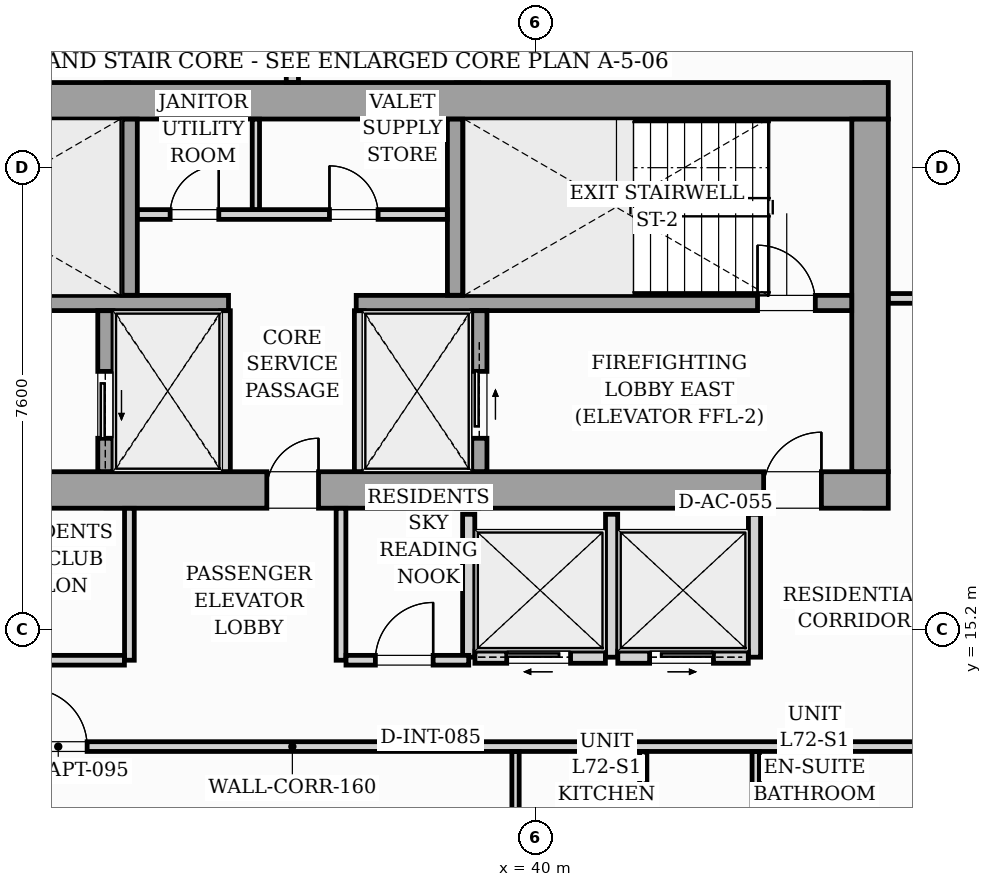
"""IFC4 building model, lengths in metres.
Left out: names, types, materials, properties, quantities, classifications, styles, units other than length and angle.
Written with IfcOpenShell. Run it as: python <this file> out.ifc"""

import sys

from ifc_helpers import new_model, si_unit, direction, frame, frame_2d, origin, origin_2d, place, context, subcontext, project, spatial, rectangle, i_section, extrude, source, transform, mapped, element, fill, save


model = new_model("IFC4")
c1 = context("Model", 3, precision=1e-05, world=origin(), true_north=direction((0.0, 1.0)))
c2 = subcontext(c1, "Body", "Model", "MODEL_VIEW")
j1 = project(units=[si_unit("LENGTHUNIT", "METRE"), si_unit("PLANEANGLEUNIT", "RADIAN")], contexts=[c1])
p1 = place(None, origin())
s1 = spatial("IfcSite", under=j1, at=p1, CompositionType="ELEMENT")
p2 = place(p1, origin())
s2 = spatial("IfcBuilding", under=s1, at=p2, CompositionType="ELEMENT")
p3 = place(p2, frame((0.0, 0.0, 249.6)))
s3 = spatial("IfcBuildingStorey", under=s2, at=p3, CompositionType="ELEMENT", Elevation=249.6)
m1 = source(origin(), c2, "Body", "SweptSolid", [
    extrude(i_section(OverallWidth=0.409, OverallDepth=0.425, WebThickness=0.033, FlangeThickness=0.052, FilletRadius=0.018, at=origin_2d()), origin(), (0.0, 0.0, 1.0), 3.296),
])
for number, where, z_axis, x_axis in (
    (1, (33.12, 17.4, 0.002), (0.0, 0.0, 1.0), (1.0, 0.0, 0.0)),
    (2, (38.88, 17.4, 0.002), (0.0, 0.0, 1.0), (1.0, 0.0, 0.0)),
    (3, (45.6, 17.4, 0.002), (0.0, 0.0, 1.0), (1.0, 0.0, 0.0)),
    (4, (33.12, 24.0, 0.002), (0.0, 0.0, 1.0), (1.0, 0.0, 0.0)),
    (5, (38.88, 24.0, 0.002), (0.0, 0.0, 1.0), (1.0, 0.0, 0.0)),
    (6, (45.6, 24.0, 0.002), (0.0, 0.0, 1.0), (1.0, 0.0, 0.0)),
):
    element("IfcColumn", number, at=place(p3, frame(where, z_axis=z_axis, x_axis=x_axis)), inside=s3, PredefinedType="PILASTER", context=c2, shape_type="MappedRepresentation", body=[
        mapped(m1, transform((0.0, 0.0, 0.0), scale=1.0)),
    ])
p4 = place(p3, frame((26.2, 17.5, 0.0), z_axis=(0.0, 0.0, 1.0), x_axis=(1.0, 0.0, 0.0)))
e7 = element("IfcWall", 7, at=p4, inside=s3, PredefinedType="SHEAR", context=c2, shape_type="SweptSolid", body=[
    extrude(rectangle(XDim=19.6, YDim=0.6, at=frame_2d((9.8, 0.0))), origin(), (0.0, 0.0, 1.0), 3.3),
])
p5 = place(p4, frame((0.95, 0.0, 0.0)))
e8 = element("IfcOpeningElement", 8, at=p5, cuts=e7, PredefinedType="OPENING", context=c2, shape_type="SweptSolid", body=[
    extrude(rectangle(XDim=0.95, YDim=2.06, at=frame_2d((0.475, 1.03))), frame((0.0, 0.31, 0.0), z_axis=(0.0, -1.0, 0.0), x_axis=(1.0, 0.0, 0.0)), (0.0, 0.0, 1.0), 0.62),
])
p6 = place(p4, frame((9.38, 0.0, 0.0)))
e9 = element("IfcOpeningElement", 9, at=p6, cuts=e7, PredefinedType="OPENING", context=c2, shape_type="SweptSolid", body=[
    extrude(rectangle(XDim=0.85, YDim=2.0, at=frame_2d((0.425, 1.0))), frame((0.0, 0.31, 0.0), z_axis=(0.0, -1.0, 0.0), x_axis=(1.0, 0.0, 0.0)), (0.0, 0.0, 1.0), 0.62),
])
p7 = place(p4, frame((17.55, 0.0, 0.0)))
e10 = element("IfcOpeningElement", 10, at=p7, cuts=e7, PredefinedType="OPENING", context=c2, shape_type="SweptSolid", body=[
    extrude(rectangle(XDim=0.95, YDim=2.06, at=frame_2d((0.475, 1.03))), frame((0.0, 0.31, 0.0), z_axis=(0.0, -1.0, 0.0), x_axis=(1.0, 0.0, 0.0)), (0.0, 0.0, 1.0), 0.62),
])
p8 = place(p3, frame((26.2, 23.9, 0.0), z_axis=(0.0, 0.0, 1.0), x_axis=(1.0, 0.0, 0.0)))
e11 = element("IfcWall", 11, at=p8, inside=s3, PredefinedType="SHEAR", context=c2, shape_type="SweptSolid", body=[
    extrude(rectangle(XDim=19.6, YDim=0.6, at=frame_2d((9.8, 0.0))), origin(), (0.0, 0.0, 1.0), 3.3),
])
p9 = place(p3, frame((45.5, 17.802, 0.0), z_axis=(0.0, 0.0, 1.0), x_axis=(0.0, 1.0, 0.0)))
e12 = element("IfcWall", 12, at=p9, inside=s3, PredefinedType="SHEAR", context=c2, shape_type="SweptSolid", body=[
    extrude(rectangle(XDim=5.796, YDim=0.6, at=frame_2d((2.898, 0.0))), origin(), (0.0, 0.0, 1.0), 3.3),
])
p10 = place(p3, frame((26.802, 20.575, 0.0), z_axis=(0.0, 0.0, 1.0), x_axis=(1.0, 0.0, 0.0)))
e13 = element("IfcWall", 13, at=p10, inside=s3, PredefinedType="SOLIDWALL", context=c2, shape_type="SweptSolid", body=[
    extrude(rectangle(XDim=8.148, YDim=0.25, at=frame_2d((4.074, 0.0))), origin(), (0.0, 0.0, 1.0), 3.3),
])
p11 = place(p10, frame((0.298, 0.0, 0.0)))
e14 = element("IfcOpeningElement", 14, at=p11, cuts=e13, PredefinedType="OPENING", context=c2, shape_type="SweptSolid", body=[
    extrude(rectangle(XDim=0.95, YDim=2.06, at=frame_2d((0.475, 1.03))), frame((0.0, 0.135, 0.0), z_axis=(0.0, -1.0, 0.0), x_axis=(1.0, 0.0, 0.0)), (0.0, 0.0, 1.0), 0.27),
])
p12 = place(p3, frame((37.05, 20.575, 0.0), z_axis=(0.0, 0.0, 1.0), x_axis=(1.0, 0.0, 0.0)))
e15 = element("IfcWall", 15, at=p12, inside=s3, PredefinedType="SOLIDWALL", context=c2, shape_type="SweptSolid", body=[
    extrude(rectangle(XDim=8.148, YDim=0.25, at=frame_2d((4.074, 0.0))), origin(), (0.0, 0.0, 1.0), 3.3),
])
p13 = place(p12, frame((6.6, 0.0, 0.0)))
e16 = element("IfcOpeningElement", 16, at=p13, cuts=e15, PredefinedType="OPENING", context=c2, shape_type="SweptSolid", body=[
    extrude(rectangle(XDim=0.95, YDim=2.06, at=frame_2d((0.475, 1.03))), frame((0.0, 0.135, 0.0), z_axis=(0.0, -1.0, 0.0), x_axis=(1.0, 0.0, 0.0)), (0.0, 0.0, 1.0), 0.27),
])
for number, where, z_axis, x_axis in (
    (17, (33.325, 20.702, 0.0), (0.0, 0.0, 1.0), (0.0, 1.0, 0.0)),
    (18, (38.675, 20.702, 0.0), (0.0, 0.0, 1.0), (0.0, 1.0, 0.0)),
):
    element("IfcWall", number, at=place(p3, frame(where, z_axis=z_axis, x_axis=x_axis)), inside=s3, PredefinedType="SOLIDWALL", context=c2, shape_type="SweptSolid", body=[
        extrude(rectangle(XDim=2.896, YDim=0.25, at=frame_2d((1.448, 0.0))), origin(), (0.0, 0.0, 1.0), 3.3),
    ])
p14 = place(p3, frame((32.925, 17.802, 0.0), z_axis=(0.0, 0.0, 1.0), x_axis=(0.0, 1.0, 0.0)))
e19 = element("IfcWall", 19, at=p14, inside=s3, PredefinedType="SOLIDWALL", context=c2, shape_type="SweptSolid", body=[
    extrude(rectangle(XDim=2.646, YDim=0.25, at=frame_2d((1.323, 0.0))), origin(), (0.0, 0.0, 1.0), 3.3),
])
p15 = place(p14, frame((0.548, 0.0, 0.0)))
e20 = element("IfcOpeningElement", 20, at=p15, cuts=e19, PredefinedType="OPENING", context=c2, shape_type="SweptSolid", body=[
    extrude(rectangle(XDim=1.1, YDim=2.08, at=frame_2d((0.55, 1.04))), frame((0.0, 0.135, 0.0), z_axis=(0.0, -1.0, 0.0), x_axis=(1.0, 0.0, 0.0)), (0.0, 0.0, 1.0), 0.27),
])
for number, where, z_axis, x_axis in (
    (21, (34.9, 17.802, 0.0), (0.0, 0.0, 1.0), (0.0, 1.0, 0.0)),
    (22, (37.1, 17.802, 0.0), (0.0, 0.0, 1.0), (0.0, 1.0, 0.0)),
):
    element("IfcWall", number, at=place(p3, frame(where, z_axis=z_axis, x_axis=x_axis)), inside=s3, PredefinedType="PARTITIONING", context=c2, shape_type="SweptSolid", body=[
        extrude(rectangle(XDim=2.646, YDim=0.16, at=frame_2d((1.323, 0.0))), origin(), (0.0, 0.0, 1.0), 3.04),
    ])
p16 = place(p3, frame((39.075, 17.802, 0.0), z_axis=(0.0, 0.0, 1.0), x_axis=(0.0, 1.0, 0.0)))
e23 = element("IfcWall", 23, at=p16, inside=s3, PredefinedType="SOLIDWALL", context=c2, shape_type="SweptSolid", body=[
    extrude(rectangle(XDim=2.646, YDim=0.25, at=frame_2d((1.323, 0.0))), origin(), (0.0, 0.0, 1.0), 3.3),
])
p17 = place(p16, frame((0.548, 0.0, 0.0)))
e24 = element("IfcOpeningElement", 24, at=p17, cuts=e23, PredefinedType="OPENING", context=c2, shape_type="SweptSolid", body=[
    extrude(rectangle(XDim=1.1, YDim=2.08, at=frame_2d((0.55, 1.04))), frame((0.0, 0.135, 0.0), z_axis=(0.0, -1.0, 0.0), x_axis=(1.0, 0.0, 0.0)), (0.0, 0.0, 1.0), 0.27),
])
p18 = place(p3, frame((33.452, 22.03, 0.0), z_axis=(0.0, 0.0, 1.0), x_axis=(1.0, 0.0, 0.0)))
e25 = element("IfcWall", 25, at=p18, inside=s3, PredefinedType="PARTITIONING", context=c2, shape_type="SweptSolid", body=[
    extrude(rectangle(XDim=5.096, YDim=0.16, at=frame_2d((2.548, 0.0))), origin(), (0.0, 0.0, 1.0), 3.04),
])
p19 = place(p18, frame((0.538, 0.0, 0.0)))
e26 = element("IfcOpeningElement", 26, at=p19, cuts=e25, PredefinedType="OPENING", context=c2, shape_type="SweptSolid", body=[
    extrude(rectangle(XDim=0.8, YDim=2.05, at=frame_2d((0.4, 1.025))), frame((0.0, 0.09, 0.0), z_axis=(0.0, -1.0, 0.0), x_axis=(1.0, 0.0, 0.0)), (0.0, 0.0, 1.0), 0.18),
])
p20 = place(p18, frame((3.158, 0.0, 0.0)))
e27 = element("IfcOpeningElement", 27, at=p20, cuts=e25, PredefinedType="OPENING", context=c2, shape_type="SweptSolid", body=[
    extrude(rectangle(XDim=0.8, YDim=2.05, at=frame_2d((0.4, 1.025))), frame((0.0, 0.09, 0.0), z_axis=(0.0, -1.0, 0.0), x_axis=(1.0, 0.0, 0.0)), (0.0, 0.0, 1.0), 0.18),
])
p21 = place(p3, frame((35.4, 22.112, 0.0), z_axis=(0.0, 0.0, 1.0), x_axis=(0.0, 1.0, 0.0)))
e28 = element("IfcWall", 28, at=p21, inside=s3, PredefinedType="PARTITIONING", context=c2, shape_type="SweptSolid", body=[
    extrude(rectangle(XDim=1.486, YDim=0.12, at=frame_2d((0.743, 0.0))), origin(), (0.0, 0.0, 1.0), 3.04),
])
for number, where, z_axis, x_axis in (
    (29, (38.9, 14.75, 0.0), (0.0, 0.0, 1.0), (0.0, 1.0, 0.0)),
    (30, (41.25, 14.75, 0.0), (0.0, 0.0, 1.0), (0.0, 1.0, 0.0)),
    (31, (43.6, 14.75, 0.0), (0.0, 0.0, 1.0), (0.0, 1.0, 0.0)),
):
    element("IfcWall", number, at=place(p3, frame(where, z_axis=z_axis, x_axis=x_axis)), inside=s3, PredefinedType="PARTITIONING", context=c2, shape_type="SweptSolid", body=[
        extrude(rectangle(XDim=2.35, YDim=0.2, at=frame_2d((1.175, 0.0))), origin(), (0.0, 0.0, 1.0), 3.04),
    ])
p22 = place(p3, frame((39.002, 14.75, 0.0), z_axis=(0.0, 0.0, 1.0), x_axis=(1.0, 0.0, 0.0)))
e32 = element("IfcWall", 32, at=p22, inside=s3, PredefinedType="PARTITIONING", context=c2, shape_type="SweptSolid", body=[
    extrude(rectangle(XDim=2.146, YDim=0.2, at=frame_2d((1.073, 0.0))), origin(), (0.0, 0.0, 1.0), 3.04),
])
p23 = place(p22, frame((0.523, 0.0, 0.0)))
e33 = element("IfcOpeningElement", 33, at=p23, cuts=e32, PredefinedType="OPENING", context=c2, shape_type="SweptSolid", body=[
    extrude(rectangle(XDim=1.05, YDim=2.08, at=frame_2d((0.525, 1.04))), frame((0.0, 0.11, 0.0), z_axis=(0.0, -1.0, 0.0), x_axis=(1.0, 0.0, 0.0)), (0.0, 0.0, 1.0), 0.22),
])
p24 = place(p3, frame((41.352, 14.75, 0.0), z_axis=(0.0, 0.0, 1.0), x_axis=(1.0, 0.0, 0.0)))
e34 = element("IfcWall", 34, at=p24, inside=s3, PredefinedType="PARTITIONING", context=c2, shape_type="SweptSolid", body=[
    extrude(rectangle(XDim=2.146, YDim=0.2, at=frame_2d((1.073, 0.0))), origin(), (0.0, 0.0, 1.0), 3.04),
])
p25 = place(p24, frame((0.523, 0.0, 0.0)))
e35 = element("IfcOpeningElement", 35, at=p25, cuts=e34, PredefinedType="OPENING", context=c2, shape_type="SweptSolid", body=[
    extrude(rectangle(XDim=1.05, YDim=2.08, at=frame_2d((0.525, 1.04))), frame((0.0, 0.11, 0.0), z_axis=(0.0, -1.0, 0.0), x_axis=(1.0, 0.0, 0.0)), (0.0, 0.0, 1.0), 0.22),
])
p26 = place(p3, frame((24.55, 13.28, 0.0), z_axis=(0.0, 0.0, 1.0), x_axis=(1.0, 0.0, 0.0)))
e36 = element("IfcWall", 36, at=p26, inside=s3, PredefinedType="PARTITIONING", context=c2, shape_type="SweptSolid", body=[
    extrude(rectangle(XDim=22.9, YDim=0.16, at=frame_2d((11.45, 0.0))), origin(), (0.0, 0.0, 1.0), 2.596),
])
p27 = place(p26, frame((7.125, 0.0, 0.0)))
e37 = element("IfcOpeningElement", 37, at=p27, cuts=e36, PredefinedType="OPENING", context=c2, shape_type="SweptSolid", body=[
    extrude(rectangle(XDim=0.95, YDim=2.06, at=frame_2d((0.475, 1.03))), frame((0.0, 0.09, 0.0), z_axis=(0.0, -1.0, 0.0), x_axis=(1.0, 0.0, 0.0)), (0.0, 0.0, 1.0), 0.18),
])
p28 = place(p3, frame((36.0, 24.202, 0.0), z_axis=(0.0, 0.0, 1.0), x_axis=(0.0, 1.0, 0.0)))
e38 = element("IfcWall", 38, at=p28, inside=s3, PredefinedType="PARTITIONING", context=c2, shape_type="SweptSolid", body=[
    extrude(rectangle(XDim=2.363, YDim=0.2, at=frame_2d((1.182, 0.0))), origin(), (0.0, 0.0, 1.0), 3.04),
])
p29 = place(p3, frame((45.802, 20.65, 0.0), z_axis=(0.0, 0.0, 1.0), x_axis=(1.0, 0.0, 0.0)))
e39 = element("IfcWall", 39, at=p29, inside=s3, PredefinedType="PARTITIONING", context=c2, shape_type="SweptSolid", body=[
    extrude(rectangle(XDim=1.566, YDim=0.16, at=frame_2d((0.783, 0.0))), origin(), (0.0, 0.0, 1.0), 3.04),
])
p30 = place(p3, frame((43.62, 8.342, 0.0), z_axis=(0.0, 0.0, 1.0), x_axis=(0.0, 1.0, 0.0)))
e40 = element("IfcWall", 40, at=p30, inside=s3, PredefinedType="PARTITIONING", context=c2, shape_type="SweptSolid", body=[
    extrude(rectangle(XDim=4.856, YDim=0.12, at=frame_2d((2.428, 0.0))), origin(), (0.0, 0.0, 1.0), 3.04),
])
p31 = place(p30, frame((2.0, 0.0, 0.0)))
e41 = element("IfcOpeningElement", 41, at=p31, cuts=e40, PredefinedType="OPENING", context=c2, shape_type="SweptSolid", body=[
    extrude(rectangle(XDim=0.55, YDim=2.0, at=frame_2d((0.275, 1.0))), frame((0.0, 0.07, 0.0), z_axis=(0.0, -1.0, 0.0), x_axis=(1.0, 0.0, 0.0)), (0.0, 0.0, 1.0), 0.14),
])
for number, where, z_axis, x_axis in (
    (42, (41.77, 11.092, 0.0), (0.0, 0.0, 1.0), (0.0, 1.0, 0.0)),
    (43, (39.67, 11.092, 0.0), (0.0, 0.0, 1.0), (0.0, 1.0, 0.0)),
):
    element("IfcWall", number, at=place(p3, frame(where, z_axis=z_axis, x_axis=x_axis)), inside=s3, PredefinedType="PARTITIONING", context=c2, shape_type="SweptSolid", body=[
        extrude(rectangle(XDim=2.106, YDim=0.12, at=frame_2d((1.053, 0.0))), origin(), (0.0, 0.0, 1.0), 3.04),
    ])
p32 = place(p3, frame((33.32, 14.7, 0.0), z_axis=(0.0, 0.0, 1.0), x_axis=(0.0, 1.0, 0.0)))
e44 = element("IfcWall", 44, at=p32, inside=s3, PredefinedType="PARTITIONING", context=c2, shape_type="SweptSolid", body=[
    extrude(rectangle(XDim=2.498, YDim=0.16, at=frame_2d((1.249, 0.0))), origin(), (0.0, 0.0, 1.0), 3.04),
])
p33 = place(p3, frame((28.442, 14.7, 0.0), z_axis=(0.0, 0.0, 1.0), x_axis=(1.0, 0.0, 0.0)))
e45 = element("IfcWall", 45, at=p33, inside=s3, PredefinedType="PARTITIONING", context=c2, shape_type="SweptSolid", body=[
    extrude(rectangle(XDim=4.796, YDim=0.16, at=frame_2d((2.398, 0.0))), origin(), (0.0, 0.0, 1.0), 2.596),
])
p34 = place(p33, frame((1.923, 0.0, 0.0)))
e46 = element("IfcOpeningElement", 46, at=p34, cuts=e45, PredefinedType="OPENING", context=c2, shape_type="SweptSolid", body=[
    extrude(rectangle(XDim=0.95, YDim=2.06, at=frame_2d((0.475, 1.03))), frame((0.0, 0.09, 0.0), z_axis=(0.0, -1.0, 0.0), x_axis=(1.0, 0.0, 0.0)), (0.0, 0.0, 1.0), 0.18),
])
p35 = place(p3, frame((36.8, 14.7, 0.0), z_axis=(0.0, 0.0, 1.0), x_axis=(0.0, 1.0, 0.0)))
e47 = element("IfcWall", 47, at=p35, inside=s3, PredefinedType="PARTITIONING", context=c2, shape_type="SweptSolid", body=[
    extrude(rectangle(XDim=2.498, YDim=0.16, at=frame_2d((1.249, 0.0))), origin(), (0.0, 0.0, 1.0), 3.04),
])
p36 = place(p3, frame((36.882, 14.7, 0.0), z_axis=(0.0, 0.0, 1.0), x_axis=(1.0, 0.0, 0.0)))
e48 = element("IfcWall", 48, at=p36, inside=s3, PredefinedType="PARTITIONING", context=c2, shape_type="SweptSolid", body=[
    extrude(rectangle(XDim=2.018, YDim=0.16, at=frame_2d((1.009, 0.0))), origin(), (0.0, 0.0, 1.0), 3.04),
])
p37 = place(p36, frame((0.483, 0.0, 0.0)))
e49 = element("IfcOpeningElement", 49, at=p37, cuts=e48, PredefinedType="OPENING", context=c2, shape_type="SweptSolid", body=[
    extrude(rectangle(XDim=0.95, YDim=2.06, at=frame_2d((0.475, 1.03))), frame((0.0, 0.09, 0.0), z_axis=(0.0, -1.0, 0.0), x_axis=(1.0, 0.0, 0.0)), (0.0, 0.0, 1.0), 0.18),
])
m2 = source(origin(), c2, "Body", "SweptSolid", [
    extrude(rectangle(XDim=0.85, YDim=2.0, at=frame_2d((0.425, 1.0))), frame((0.0, 0.025, 0.0), z_axis=(0.0, -1.0, 0.0), x_axis=(1.0, 0.0, 0.0)), (0.0, 0.0, 1.0), 0.05),
])
p38 = place(p6, origin())
e50 = element("IfcDoor", 50, at=p38, inside=s3, OperationType="SINGLE_SWING_RIGHT", PredefinedType="DOOR", context=c2, shape_type="MappedRepresentation", body=[
    mapped(m2, transform((0.0, 0.0, 0.0), scale=1.0)),
])
fill(e9, e50)
m3 = source(origin(), c2, "Body", "SweptSolid", [
    extrude(rectangle(XDim=0.95, YDim=2.06, at=frame_2d((0.475, 1.03))), frame((0.0, 0.025, 0.0), z_axis=(0.0, -1.0, 0.0), x_axis=(1.0, 0.0, 0.0)), (0.0, 0.0, 1.0), 0.05),
])
p39 = place(p7, origin())
e51 = element("IfcDoor", 51, at=p39, inside=s3, OperationType="SINGLE_SWING_RIGHT", PredefinedType="DOOR", context=c2, shape_type="MappedRepresentation", body=[
    mapped(m3, transform((0.0, 0.0, 0.0), scale=1.0)),
])
fill(e10, e51)
p40 = place(p13, origin())
e52 = element("IfcDoor", 52, at=p40, inside=s3, OperationType="SINGLE_SWING_LEFT", PredefinedType="DOOR", context=c2, shape_type="MappedRepresentation", body=[
    mapped(m3, transform((0.0, 0.0, 0.0), scale=1.0)),
])
fill(e16, e52)
m4 = source(origin(), c2, "Body", "SweptSolid", [
    extrude(rectangle(XDim=1.1, YDim=2.08, at=frame_2d((0.55, 1.04))), frame((0.0, 0.025, 0.0), z_axis=(0.0, -1.0, 0.0), x_axis=(1.0, 0.0, 0.0)), (0.0, 0.0, 1.0), 0.05),
])
p41 = place(p15, origin())
e53 = element("IfcDoor", 53, at=p41, inside=s3, OperationType="SLIDING_TO_LEFT", PredefinedType="DOOR", context=c2, shape_type="MappedRepresentation", body=[
    mapped(m4, transform((0.0, 0.0, 0.0), scale=1.0)),
])
fill(e20, e53)
p42 = place(p17, origin())
e54 = element("IfcDoor", 54, at=p42, inside=s3, OperationType="SLIDING_TO_RIGHT", PredefinedType="DOOR", context=c2, shape_type="MappedRepresentation", body=[
    mapped(m4, transform((0.0, 0.0, 0.0), scale=1.0)),
])
fill(e24, e54)
m5 = source(origin(), c2, "Body", "SweptSolid", [
    extrude(rectangle(XDim=0.8, YDim=2.05, at=frame_2d((0.4, 1.025))), frame((0.0, 0.025, 0.0), z_axis=(0.0, -1.0, 0.0), x_axis=(1.0, 0.0, 0.0)), (0.0, 0.0, 1.0), 0.05),
])
p43 = place(p19, origin())
e55 = element("IfcDoor", 55, at=p43, inside=s3, OperationType="SINGLE_SWING_RIGHT", PredefinedType="DOOR", context=c2, shape_type="MappedRepresentation", body=[
    mapped(m5, transform((0.0, 0.0, 0.0), scale=1.0)),
])
fill(e26, e55)
p44 = place(p20, origin())
e56 = element("IfcDoor", 56, at=p44, inside=s3, OperationType="SINGLE_SWING_LEFT", PredefinedType="DOOR", context=c2, shape_type="MappedRepresentation", body=[
    mapped(m5, transform((0.0, 0.0, 0.0), scale=1.0)),
])
fill(e27, e56)
m6 = source(origin(), c2, "Body", "SweptSolid", [
    extrude(rectangle(XDim=1.05, YDim=2.08, at=frame_2d((0.525, 1.04))), frame((0.0, 0.025, 0.0), z_axis=(0.0, -1.0, 0.0), x_axis=(1.0, 0.0, 0.0)), (0.0, 0.0, 1.0), 0.05),
])
p45 = place(p23, origin())
e57 = element("IfcDoor", 57, at=p45, inside=s3, OperationType="SLIDING_TO_LEFT", PredefinedType="DOOR", context=c2, shape_type="MappedRepresentation", body=[
    mapped(m6, transform((0.0, 0.0, 0.0), scale=1.0)),
])
fill(e33, e57)
p46 = place(p25, origin())
e58 = element("IfcDoor", 58, at=p46, inside=s3, OperationType="SLIDING_TO_RIGHT", PredefinedType="DOOR", context=c2, shape_type="MappedRepresentation", body=[
    mapped(m6, transform((0.0, 0.0, 0.0), scale=1.0)),
])
fill(e35, e58)
m7 = source(origin(), c2, "Body", "SweptSolid", [
    extrude(rectangle(XDim=0.95, YDim=2.06, at=frame_2d((0.475, 1.03))), frame((0.0, 0.025, 0.0), z_axis=(0.0, -1.0, 0.0), x_axis=(1.0, 0.0, 0.0)), (0.0, 0.0, 1.0), 0.05),
])
p47 = place(p27, origin())
e59 = element("IfcDoor", 59, at=p47, inside=s3, OperationType="SINGLE_SWING_LEFT", PredefinedType="DOOR", context=c2, shape_type="MappedRepresentation", body=[
    mapped(m7, transform((0.0, 0.0, 0.0), scale=1.0)),
])
fill(e37, e59)
p48 = place(p37, origin())
e60 = element("IfcDoor", 60, at=p48, inside=s3, OperationType="SINGLE_SWING_RIGHT", PredefinedType="DOOR", context=c2, shape_type="MappedRepresentation", body=[
    mapped(m7, transform((0.0, 0.0, 0.0), scale=1.0)),
])
fill(e49, e60)
save(model, sys.argv[1])
